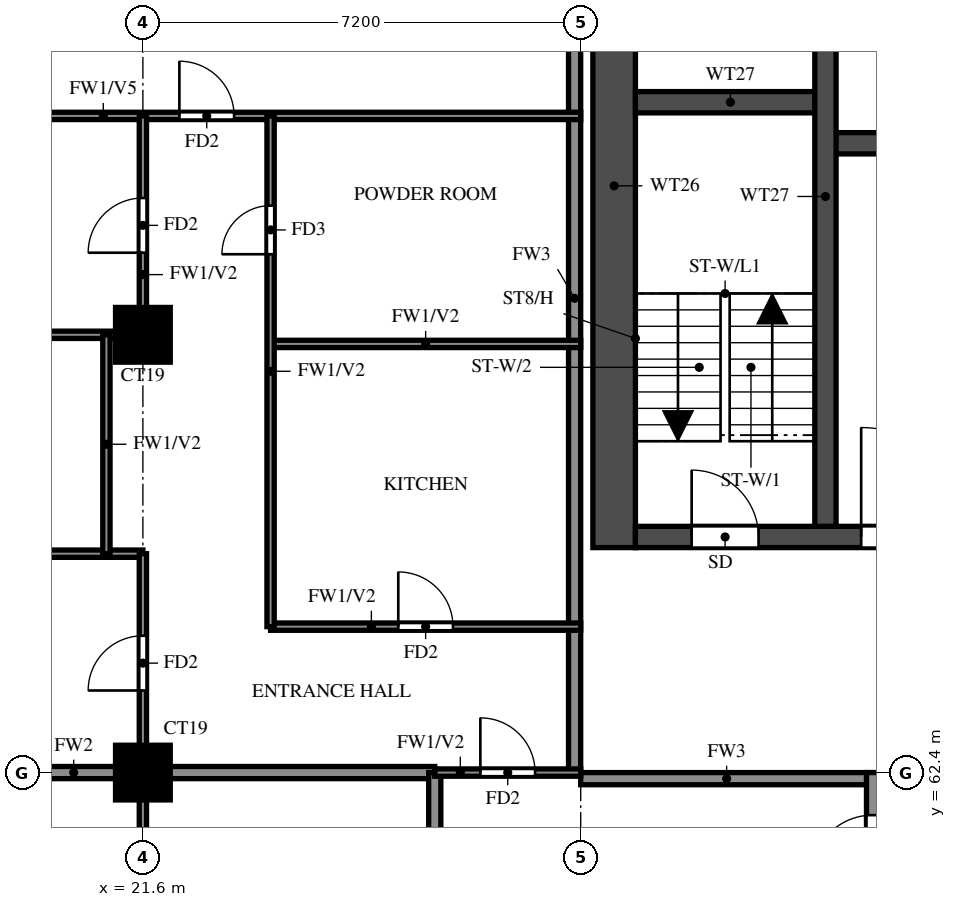
"""IFC4 building model, lengths in metres.
Left out: names, types, materials, properties, quantities, classifications, styles, units other than length and angle.
Written with IfcOpenShell. Run it as: python <this file> out.ifc"""

import sys

from ifc_helpers import new_model, si_unit, direction, frame, frame_2d, origin, origin_2d, place, context, subcontext, project, spatial, rectangle, extrude, source, transform, mapped, element, fill, save


model = new_model("IFC4")
c1 = context("Model", 3, precision=1e-05, world=origin(), true_north=direction((0.0, 1.0)))
c2 = subcontext(c1, "Body", "Model", "MODEL_VIEW")
j1 = project(units=[si_unit("LENGTHUNIT", "METRE"), si_unit("PLANEANGLEUNIT", "RADIAN")], contexts=[c1])
p1 = place(None, origin())
s1 = spatial("IfcSite", under=j1, at=p1, CompositionType="ELEMENT")
p2 = place(p1, origin())
s2 = spatial("IfcBuilding", under=s1, at=p2, CompositionType="ELEMENT")
p3 = place(p2, frame((0.0, 0.0, 195.5)))
s3 = spatial("IfcBuildingStorey", under=s2, at=p3, CompositionType="ELEMENT", Elevation=195.5)
m1 = source(origin(), c2, "Body", "SweptSolid", [
    extrude(rectangle(XDim=0.9, YDim=0.9, at=origin_2d()), origin(), (0.0, 0.0, 1.0), 3.2),
])
for number, where, z_axis, x_axis in (
    (1, (21.6, 62.4, 0.0), (0.0, 0.0, 1.0), (1.0, 0.0, 0.0)),
    (2, (21.6, 69.6, 0.0), (0.0, 0.0, 1.0), (1.0, 0.0, 0.0)),
):
    element("IfcColumn", number, at=place(p3, frame(where, z_axis=z_axis, x_axis=x_axis)), inside=s3, PredefinedType="COLUMN", context=c2, shape_type="MappedRepresentation", body=[
        mapped(m1, transform((0.0, 0.0, 0.0))),
    ])
p4 = place(p3, frame((29.35, 66.1, 0.0), z_axis=(0.0, 0.0, 1.0), x_axis=(0.0, 1.0, 0.0)))
e3 = element("IfcWall", 3, at=p4, inside=s3, PredefinedType="SHEAR", context=c2, shape_type="SweptSolid", body=[
    extrude(rectangle(XDim=11.9, YDim=0.7, at=frame_2d((5.95, 0.0))), origin(), (0.0, 0.0, 1.0), 3.2),
])
p5 = place(p3, frame((29.7, 66.275, 0.0), z_axis=(0.0, 0.0, 1.0), x_axis=(1.0, 0.0, 0.0)))
e4 = element("IfcWall", 4, at=p5, inside=s3, PredefinedType="SHEAR", context=c2, shape_type="SweptSolid", body=[
    extrude(rectangle(XDim=41.4, YDim=0.35, at=frame_2d((20.7, 0.0))), origin(), (0.0, 0.0, 1.0), 3.2),
])
p6 = place(p5, frame((0.925, 0.0, 0.0)))
e5 = element("IfcOpeningElement", 5, at=p6, cuts=e4, PredefinedType="OPENING", context=c2, shape_type="SweptSolid", body=[
    extrude(rectangle(XDim=1.1, YDim=2.1, at=frame_2d((0.55, 1.05))), frame((0.0, 0.185, 0.0), z_axis=(0.0, -1.0, 0.0), x_axis=(1.0, 0.0, 0.0)), (0.0, 0.0, 1.0), 0.37),
])
p7 = place(p5, frame((3.712, 0.0, 0.0)))
e6 = element("IfcOpeningElement", 6, at=p7, cuts=e4, PredefinedType="OPENING", context=c2, shape_type="SweptSolid", body=[
    extrude(rectangle(XDim=1.8, YDim=2.1, at=frame_2d((0.9, 1.05))), frame((0.0, 0.185, 0.0), z_axis=(0.0, -1.0, 0.0), x_axis=(1.0, 0.0, 0.0)), (0.0, 0.0, 1.0), 0.37),
])
p8 = place(p3, frame((32.825, 72.75, 0.0), z_axis=(0.0, 0.0, 1.0), x_axis=(1.0, 0.0, 0.0)))
e7 = element("IfcWall", 7, at=p8, inside=s3, PredefinedType="SHEAR", context=c2, shape_type="SweptSolid", body=[
    extrude(rectangle(XDim=35.15, YDim=0.35, at=frame_2d((17.575, 0.0))), origin(), (0.0, 0.0, 1.0), 3.2),
])
p9 = place(p8, frame((19.8, 0.0, 0.0)))
e8 = element("IfcOpeningElement", 8, at=p9, cuts=e7, PredefinedType="OPENING", context=c2, shape_type="SweptSolid", body=[
    extrude(rectangle(XDim=1.1, YDim=2.1, at=frame_2d((0.55, 1.05))), frame((0.0, 0.185, 0.0), z_axis=(0.0, -1.0, 0.0), x_axis=(1.0, 0.0, 0.0)), (0.0, 0.0, 1.0), 0.37),
])
p10 = place(p8, frame((27.7, 0.0, 0.0)))
e9 = element("IfcOpeningElement", 9, at=p10, cuts=e7, PredefinedType="OPENING", context=c2, shape_type="SweptSolid", body=[
    extrude(rectangle(XDim=1.1, YDim=2.1, at=frame_2d((0.55, 1.05))), frame((0.0, 0.185, 0.0), z_axis=(0.0, -1.0, 0.0), x_axis=(1.0, 0.0, 0.0)), (0.0, 0.0, 1.0), 0.37),
])
p11 = place(p8, frame((30.3, 0.0, 0.0)))
e10 = element("IfcOpeningElement", 10, at=p11, cuts=e7, PredefinedType="OPENING", context=c2, shape_type="SweptSolid", body=[
    extrude(rectangle(XDim=1.1, YDim=2.1, at=frame_2d((0.55, 1.05))), frame((0.0, 0.185, 0.0), z_axis=(0.0, -1.0, 0.0), x_axis=(1.0, 0.0, 0.0)), (0.0, 0.0, 1.0), 0.37),
])
p12 = place(p8, frame((3.8, 0.0, 0.0)))
e11 = element("IfcOpeningElement", 11, at=p12, cuts=e7, PredefinedType="OPENING", context=c2, shape_type="SweptSolid", body=[
    extrude(rectangle(XDim=1.1, YDim=2.1, at=frame_2d((0.55, 1.05))), frame((0.0, 0.185, 0.0), z_axis=(0.0, -1.0, 0.0), x_axis=(1.0, 0.0, 0.0)), (0.0, 0.0, 1.0), 0.37),
])
p13 = place(p8, frame((6.55, 0.0, 0.0)))
e12 = element("IfcOpeningElement", 12, at=p13, cuts=e7, PredefinedType="OPENING", context=c2, shape_type="SweptSolid", body=[
    extrude(rectangle(XDim=1.1, YDim=2.1, at=frame_2d((0.55, 1.05))), frame((0.0, 0.185, 0.0), z_axis=(0.0, -1.0, 0.0), x_axis=(1.0, 0.0, 0.0)), (0.0, 0.0, 1.0), 0.37),
])
p14 = place(p8, frame((9.3, 0.0, 0.0)))
e13 = element("IfcOpeningElement", 13, at=p14, cuts=e7, PredefinedType="OPENING", context=c2, shape_type="SweptSolid", body=[
    extrude(rectangle(XDim=1.1, YDim=2.1, at=frame_2d((0.55, 1.05))), frame((0.0, 0.185, 0.0), z_axis=(0.0, -1.0, 0.0), x_axis=(1.0, 0.0, 0.0)), (0.0, 0.0, 1.0), 0.37),
])
p15 = place(p8, frame((12.05, 0.0, 0.0)))
e14 = element("IfcOpeningElement", 14, at=p15, cuts=e7, PredefinedType="OPENING", context=c2, shape_type="SweptSolid", body=[
    extrude(rectangle(XDim=1.1, YDim=2.1, at=frame_2d((0.55, 1.05))), frame((0.0, 0.185, 0.0), z_axis=(0.0, -1.0, 0.0), x_axis=(1.0, 0.0, 0.0)), (0.0, 0.0, 1.0), 0.37),
])
p16 = place(p8, frame((14.8, 0.0, 0.0)))
e15 = element("IfcOpeningElement", 15, at=p16, cuts=e7, PredefinedType="OPENING", context=c2, shape_type="SweptSolid", body=[
    extrude(rectangle(XDim=1.1, YDim=2.1, at=frame_2d((0.55, 1.05))), frame((0.0, 0.185, 0.0), z_axis=(0.0, -1.0, 0.0), x_axis=(1.0, 0.0, 0.0)), (0.0, 0.0, 1.0), 0.37),
])
p17 = place(p8, frame((17.55, 0.0, 0.0)))
e16 = element("IfcOpeningElement", 16, at=p17, cuts=e7, PredefinedType="OPENING", context=c2, shape_type="SweptSolid", body=[
    extrude(rectangle(XDim=1.1, YDim=2.1, at=frame_2d((0.55, 1.05))), frame((0.0, 0.185, 0.0), z_axis=(0.0, -1.0, 0.0), x_axis=(1.0, 0.0, 0.0)), (0.0, 0.0, 1.0), 0.37),
])
p18 = place(p8, frame((0.938, 0.0, 0.0)))
e17 = element("IfcOpeningElement", 17, at=p18, cuts=e7, PredefinedType="OPENING", context=c2, shape_type="SweptSolid", body=[
    extrude(rectangle(XDim=1.1, YDim=2.1, at=frame_2d((0.55, 1.05))), frame((0.0, 0.185, 0.0), z_axis=(0.0, -1.0, 0.0), x_axis=(1.0, 0.0, 0.0)), (0.0, 0.0, 1.0), 0.37),
])
p19 = place(p3, frame((29.7, 73.425, 0.0), z_axis=(0.0, 0.0, 1.0), x_axis=(1.0, 0.0, 0.0)))
e18 = element("IfcWall", 18, at=p19, inside=s3, PredefinedType="SHEAR", context=c2, shape_type="SweptSolid", body=[
    extrude(rectangle(XDim=3.125, YDim=0.35, at=frame_2d((1.562, 0.0))), origin(), (0.0, 0.0, 1.0), 3.2),
])
p20 = place(p3, frame((32.825, 66.45, 0.0), z_axis=(0.0, 0.0, 1.0), x_axis=(0.0, 1.0, 0.0)))
e19 = element("IfcWall", 19, at=p20, inside=s3, PredefinedType="SHEAR", context=c2, shape_type="SweptSolid", body=[
    extrude(rectangle(XDim=10.85, YDim=0.35, at=frame_2d((5.425, 0.0))), origin(), (0.0, 0.0, 1.0), 3.2),
])
p21 = place(p3, frame((28.8, 62.3, 0.0), z_axis=(0.0, 0.0, 1.0), x_axis=(1.0, 0.0, 0.0)))
e20 = element("IfcWall", 20, at=p21, inside=s3, PredefinedType="SOLIDWALL", context=c2, shape_type="SweptSolid", body=[
    extrude(rectangle(XDim=4.8, YDim=0.2, at=frame_2d((2.4, 0.0))), origin(), (0.0, 0.0, 1.0), 3.2),
])
p22 = place(p3, frame((28.7, 62.4, 0.0), z_axis=(0.0, 0.0, 1.0), x_axis=(0.0, 1.0, 0.0)))
e21 = element("IfcWall", 21, at=p22, inside=s3, PredefinedType="SOLIDWALL", context=c2, shape_type="SweptSolid", body=[
    extrude(rectangle(XDim=15.6, YDim=0.2, at=frame_2d((7.8, 0.0))), origin(), (0.0, 0.0, 1.0), 3.2),
])
p23 = place(p3, frame((33.6, 45.6, 0.0), z_axis=(0.0, 0.0, 1.0), x_axis=(0.0, 1.0, 0.0)))
e22 = element("IfcWall", 22, at=p23, inside=s3, PredefinedType="SOLIDWALL", context=c2, shape_type="SweptSolid", body=[
    extrude(rectangle(XDim=16.8, YDim=0.2, at=frame_2d((8.4, 0.0))), origin(), (0.0, 0.0, 1.0), 3.2),
])
p24 = place(p23, frame((0.7, 0.0, 0.0)))
e23 = element("IfcOpeningElement", 23, at=p24, cuts=e22, PredefinedType="OPENING", context=c2, shape_type="SweptSolid", body=[
    extrude(rectangle(XDim=1.0, YDim=2.1, at=frame_2d((0.5, 1.05))), frame((0.0, 0.11, 0.0), z_axis=(0.0, -1.0, 0.0), x_axis=(1.0, 0.0, 0.0)), (0.0, 0.0, 1.0), 0.22),
])
p25 = place(p23, frame((8.3, 0.0, 0.0)))
e24 = element("IfcOpeningElement", 24, at=p25, cuts=e22, PredefinedType="OPENING", context=c2, shape_type="SweptSolid", body=[
    extrude(rectangle(XDim=1.0, YDim=2.1, at=frame_2d((0.5, 1.05))), frame((0.0, 0.11, 0.0), z_axis=(0.0, -1.0, 0.0), x_axis=(1.0, 0.0, 0.0)), (0.0, 0.0, 1.0), 0.22),
])
p26 = place(p23, frame((15.1, 0.0, 0.0)))
e25 = element("IfcOpeningElement", 25, at=p26, cuts=e22, PredefinedType="OPENING", context=c2, shape_type="SweptSolid", body=[
    extrude(rectangle(XDim=1.0, YDim=2.1, at=frame_2d((0.5, 1.05))), frame((0.0, 0.11, 0.0), z_axis=(0.0, -1.0, 0.0), x_axis=(1.0, 0.0, 0.0)), (0.0, 0.0, 1.0), 0.22),
])
p27 = place(p3, frame((14.525, 62.4, 0.0), z_axis=(0.0, 0.0, 1.0), x_axis=(1.0, 0.0, 0.0)))
e26 = element("IfcWall", 26, at=p27, inside=s3, PredefinedType="SOLIDWALL", context=c2, shape_type="SweptSolid", body=[
    extrude(rectangle(XDim=11.875, YDim=0.2, at=frame_2d((5.938, 0.0))), origin(), (0.0, 0.0, 1.0), 3.2),
])
p28 = place(p3, frame((26.4, 60.0, 0.0), z_axis=(0.0, 0.0, 1.0), x_axis=(0.0, 1.0, 0.0)))
e27 = element("IfcWall", 27, at=p28, inside=s3, PredefinedType="SOLIDWALL", context=c2, shape_type="SweptSolid", body=[
    extrude(rectangle(XDim=2.4, YDim=0.2, at=frame_2d((1.2, 0.0))), origin(), (0.0, 0.0, 1.0), 3.2),
])
p29 = place(p3, frame((26.4, 62.4, 0.0), z_axis=(0.0, 0.0, 1.0), x_axis=(1.0, 0.0, 0.0)))
e28 = element("IfcWall", 28, at=p29, inside=s3, PredefinedType="PARTITIONING", context=c2, shape_type="SweptSolid", body=[
    extrude(rectangle(XDim=2.4, YDim=0.12, at=frame_2d((1.2, 0.0))), origin(), (0.0, 0.0, 1.0), 3.2),
])
p30 = place(p29, frame((0.75, 0.0, 0.0)))
e29 = element("IfcOpeningElement", 29, at=p30, cuts=e28, PredefinedType="OPENING", context=c2, shape_type="SweptSolid", body=[
    extrude(rectangle(XDim=0.9, YDim=2.1, at=frame_2d((0.45, 1.05))), frame((0.0, 0.07, 0.0), z_axis=(0.0, -1.0, 0.0), x_axis=(1.0, 0.0, 0.0)), (0.0, 0.0, 1.0), 0.14),
])
p31 = place(p3, frame((23.7, 64.8, 0.0), z_axis=(0.0, 0.0, 1.0), x_axis=(1.0, 0.0, 0.0)))
e30 = element("IfcWall", 30, at=p31, inside=s3, PredefinedType="PARTITIONING", context=c2, shape_type="SweptSolid", body=[
    extrude(rectangle(XDim=5.1, YDim=0.12, at=frame_2d((2.55, 0.0))), origin(), (0.0, 0.0, 1.0), 3.2),
])
p32 = place(p31, frame((2.1, 0.0, 0.0)))
e31 = element("IfcOpeningElement", 31, at=p32, cuts=e30, PredefinedType="OPENING", context=c2, shape_type="SweptSolid", body=[
    extrude(rectangle(XDim=0.9, YDim=2.1, at=frame_2d((0.45, 1.05))), frame((0.0, 0.07, 0.0), z_axis=(0.0, -1.0, 0.0), x_axis=(1.0, 0.0, 0.0)), (0.0, 0.0, 1.0), 0.14),
])
p33 = place(p3, frame((14.525, 66.0, 0.0), z_axis=(0.0, 0.0, 1.0), x_axis=(1.0, 0.0, 0.0)))
e32 = element("IfcWall", 32, at=p33, inside=s3, PredefinedType="PARTITIONING", context=c2, shape_type="SweptSolid", body=[
    extrude(rectangle(XDim=7.075, YDim=0.12, at=frame_2d((3.538, 0.0))), origin(), (0.0, 0.0, 1.0), 2.3),
])
p34 = place(p33, frame((2.837, 0.0, 0.0)))
e33 = element("IfcOpeningElement", 33, at=p34, cuts=e32, PredefinedType="OPENING", context=c2, shape_type="SweptSolid", body=[
    extrude(rectangle(XDim=0.8, YDim=2.1, at=frame_2d((0.4, 1.05))), frame((0.0, 0.07, 0.0), z_axis=(0.0, -1.0, 0.0), x_axis=(1.0, 0.0, 0.0)), (0.0, 0.0, 1.0), 0.14),
])
p35 = place(p3, frame((23.7, 69.45, 0.0), z_axis=(0.0, 0.0, 1.0), x_axis=(1.0, 0.0, 0.0)))
e34 = element("IfcWall", 34, at=p35, inside=s3, PredefinedType="PARTITIONING", context=c2, shape_type="SweptSolid", body=[
    extrude(rectangle(XDim=5.1, YDim=0.12, at=frame_2d((2.55, 0.0))), origin(), (0.0, 0.0, 1.0), 3.2),
])
p36 = place(p3, frame((14.525, 69.6, 0.0), z_axis=(0.0, 0.0, 1.0), x_axis=(1.0, 0.0, 0.0)))
e35 = element("IfcWall", 35, at=p36, inside=s3, PredefinedType="PARTITIONING", context=c2, shape_type="SweptSolid", body=[
    extrude(rectangle(XDim=7.075, YDim=0.12, at=frame_2d((3.538, 0.0))), origin(), (0.0, 0.0, 1.0), 3.2),
])
p37 = place(p3, frame((14.525, 73.2, 0.0), z_axis=(0.0, 0.0, 1.0), x_axis=(1.0, 0.0, 0.0)))
e36 = element("IfcWall", 36, at=p37, inside=s3, PredefinedType="PARTITIONING", context=c2, shape_type="SweptSolid", body=[
    extrude(rectangle(XDim=14.275, YDim=0.12, at=frame_2d((7.138, 0.0))), origin(), (0.0, 0.0, 1.0), 2.3),
])
p38 = place(p37, frame((7.675, 0.0, 0.0)))
e37 = element("IfcOpeningElement", 37, at=p38, cuts=e36, PredefinedType="OPENING", context=c2, shape_type="SweptSolid", body=[
    extrude(rectangle(XDim=0.9, YDim=2.1, at=frame_2d((0.45, 1.05))), frame((0.0, 0.07, 0.0), z_axis=(0.0, -1.0, 0.0), x_axis=(1.0, 0.0, 0.0)), (0.0, 0.0, 1.0), 0.14),
])
p39 = place(p3, frame((21.0, 66.0, 0.0), z_axis=(0.0, 0.0, 1.0), x_axis=(0.0, 1.0, 0.0)))
e38 = element("IfcWall", 38, at=p39, inside=s3, PredefinedType="PARTITIONING", context=c2, shape_type="SweptSolid", body=[
    extrude(rectangle(XDim=3.6, YDim=0.12, at=frame_2d((1.8, 0.0))), origin(), (0.0, 0.0, 1.0), 3.2),
])
p40 = place(p3, frame((21.6, 48.0, 0.0), z_axis=(0.0, 0.0, 1.0), x_axis=(0.0, 1.0, 0.0)))
e39 = element("IfcWall", 39, at=p40, inside=s3, PredefinedType="PARTITIONING", context=c2, shape_type="SweptSolid", body=[
    extrude(rectangle(XDim=18.0, YDim=0.12, at=frame_2d((9.0, 0.0))), origin(), (0.0, 0.0, 1.0), 3.2),
])
p41 = place(p40, frame((1.35, 0.0, 0.0)))
e40 = element("IfcOpeningElement", 40, at=p41, cuts=e39, PredefinedType="OPENING", context=c2, shape_type="SweptSolid", body=[
    extrude(rectangle(XDim=0.9, YDim=2.1, at=frame_2d((0.45, 1.05))), frame((0.0, 0.07, 0.0), z_axis=(0.0, -1.0, 0.0), x_axis=(1.0, 0.0, 0.0)), (0.0, 0.0, 1.0), 0.14),
])
p42 = place(p40, frame((7.95, 0.0, 0.0)))
e41 = element("IfcOpeningElement", 41, at=p42, cuts=e39, PredefinedType="OPENING", context=c2, shape_type="SweptSolid", body=[
    extrude(rectangle(XDim=1.5, YDim=2.1, at=frame_2d((0.75, 1.05))), frame((0.0, 0.07, 0.0), z_axis=(0.0, -1.0, 0.0), x_axis=(1.0, 0.0, 0.0)), (0.0, 0.0, 1.0), 0.14),
])
p43 = place(p40, frame((12.15, 0.0, 0.0)))
e42 = element("IfcOpeningElement", 42, at=p43, cuts=e39, PredefinedType="OPENING", context=c2, shape_type="SweptSolid", body=[
    extrude(rectangle(XDim=0.9, YDim=2.1, at=frame_2d((0.45, 1.05))), frame((0.0, 0.07, 0.0), z_axis=(0.0, -1.0, 0.0), x_axis=(1.0, 0.0, 0.0)), (0.0, 0.0, 1.0), 0.14),
])
p44 = place(p40, frame((15.75, 0.0, 0.0)))
e43 = element("IfcOpeningElement", 43, at=p44, cuts=e39, PredefinedType="OPENING", context=c2, shape_type="SweptSolid", body=[
    extrude(rectangle(XDim=0.9, YDim=2.1, at=frame_2d((0.45, 1.05))), frame((0.0, 0.07, 0.0), z_axis=(0.0, -1.0, 0.0), x_axis=(1.0, 0.0, 0.0)), (0.0, 0.0, 1.0), 0.14),
])
p45 = place(p3, frame((21.6, 69.6, 0.0), z_axis=(0.0, 0.0, 1.0), x_axis=(0.0, 1.0, 0.0)))
e44 = element("IfcWall", 44, at=p45, inside=s3, PredefinedType="PARTITIONING", context=c2, shape_type="SweptSolid", body=[
    extrude(rectangle(XDim=3.6, YDim=0.12, at=frame_2d((1.8, 0.0))), origin(), (0.0, 0.0, 1.0), 3.2),
])
p46 = place(p45, frame((1.35, 0.0, 0.0)))
e45 = element("IfcOpeningElement", 45, at=p46, cuts=e44, PredefinedType="OPENING", context=c2, shape_type="SweptSolid", body=[
    extrude(rectangle(XDim=0.9, YDim=2.1, at=frame_2d((0.45, 1.05))), frame((0.0, 0.07, 0.0), z_axis=(0.0, -1.0, 0.0), x_axis=(1.0, 0.0, 0.0)), (0.0, 0.0, 1.0), 0.14),
])
p47 = place(p3, frame((23.7, 64.8, 0.0), z_axis=(0.0, 0.0, 1.0), x_axis=(0.0, 1.0, 0.0)))
e46 = element("IfcWall", 46, at=p47, inside=s3, PredefinedType="PARTITIONING", context=c2, shape_type="SweptSolid", body=[
    extrude(rectangle(XDim=8.4, YDim=0.12, at=frame_2d((4.2, 0.0))), origin(), (0.0, 0.0, 1.0), 3.2),
])
p48 = place(p47, frame((6.125, 0.0, 0.0)))
e47 = element("IfcOpeningElement", 47, at=p48, cuts=e46, PredefinedType="OPENING", context=c2, shape_type="SweptSolid", body=[
    extrude(rectangle(XDim=0.8, YDim=2.1, at=frame_2d((0.4, 1.05))), frame((0.0, 0.07, 0.0), z_axis=(0.0, -1.0, 0.0), x_axis=(1.0, 0.0, 0.0)), (0.0, 0.0, 1.0), 0.14),
])
p49 = place(p6, origin())
e48 = element("IfcDoor", 48, at=p49, inside=s3, OperationType="SINGLE_SWING_LEFT", PredefinedType="DOOR", context=c2, shape_type="SweptSolid", body=[
    extrude(rectangle(XDim=1.1, YDim=2.1, at=frame_2d((0.55, 1.05))), frame((0.0, 0.025, 0.0), z_axis=(0.0, -1.0, 0.0), x_axis=(1.0, 0.0, 0.0)), (0.0, 0.0, 1.0), 0.05),
])
fill(e5, e48)
p50 = place(p7, origin())
e49 = element("IfcDoor", 49, at=p50, inside=s3, OperationType="DOUBLE_DOOR_SINGLE_SWING", PredefinedType="DOOR", context=c2, shape_type="SweptSolid", body=[
    extrude(rectangle(XDim=1.8, YDim=2.1, at=frame_2d((0.9, 1.05))), frame((0.0, 0.025, 0.0), z_axis=(0.0, -1.0, 0.0), x_axis=(1.0, 0.0, 0.0)), (0.0, 0.0, 1.0), 0.05),
])
fill(e6, e49)
p51 = place(p30, origin())
e50 = element("IfcDoor", 50, at=p51, inside=s3, OperationType="SINGLE_SWING_RIGHT", PredefinedType="DOOR", context=c2, shape_type="SweptSolid", body=[
    extrude(rectangle(XDim=0.9, YDim=2.1, at=frame_2d((0.45, 1.05))), frame((0.0, 0.025, 0.0), z_axis=(0.0, -1.0, 0.0), x_axis=(1.0, 0.0, 0.0)), (0.0, 0.0, 1.0), 0.05),
])
fill(e29, e50)
p52 = place(p26, origin())
e51 = element("IfcDoor", 51, at=p52, inside=s3, OperationType="SINGLE_SWING_LEFT", PredefinedType="DOOR", context=c2, shape_type="SweptSolid", body=[
    extrude(rectangle(XDim=1.0, YDim=2.1, at=frame_2d((0.5, 1.05))), frame((0.0, 0.025, 0.0), z_axis=(0.0, -1.0, 0.0), x_axis=(1.0, 0.0, 0.0)), (0.0, 0.0, 1.0), 0.05),
])
fill(e25, e51)
p53 = place(p44, origin())
e52 = element("IfcDoor", 52, at=p53, inside=s3, OperationType="SINGLE_SWING_LEFT", PredefinedType="DOOR", context=c2, shape_type="SweptSolid", body=[
    extrude(rectangle(XDim=0.9, YDim=2.1, at=frame_2d((0.45, 1.05))), frame((0.0, 0.025, 0.0), z_axis=(0.0, -1.0, 0.0), x_axis=(1.0, 0.0, 0.0)), (0.0, 0.0, 1.0), 0.05),
])
fill(e43, e52)
p54 = place(p46, origin())
e53 = element("IfcDoor", 53, at=p54, inside=s3, OperationType="SINGLE_SWING_LEFT", PredefinedType="DOOR", context=c2, shape_type="SweptSolid", body=[
    extrude(rectangle(XDim=0.9, YDim=2.1, at=frame_2d((0.45, 1.05))), frame((0.0, 0.025, 0.0), z_axis=(0.0, -1.0, 0.0), x_axis=(1.0, 0.0, 0.0)), (0.0, 0.0, 1.0), 0.05),
])
fill(e45, e53)
p55 = place(p38, origin())
e54 = element("IfcDoor", 54, at=p55, inside=s3, OperationType="SINGLE_SWING_LEFT", PredefinedType="DOOR", context=c2, shape_type="SweptSolid", body=[
    extrude(rectangle(XDim=0.9, YDim=2.1, at=frame_2d((0.45, 1.05))), frame((0.0, 0.025, 0.0), z_axis=(0.0, -1.0, 0.0), x_axis=(1.0, 0.0, 0.0)), (0.0, 0.0, 1.0), 0.05),
])
fill(e37, e54)
p56 = place(p32, origin())
e55 = element("IfcDoor", 55, at=p56, inside=s3, OperationType="SINGLE_SWING_RIGHT", PredefinedType="DOOR", context=c2, shape_type="SweptSolid", body=[
    extrude(rectangle(XDim=0.9, YDim=2.1, at=frame_2d((0.45, 1.05))), frame((0.0, 0.025, 0.0), z_axis=(0.0, -1.0, 0.0), x_axis=(1.0, 0.0, 0.0)), (0.0, 0.0, 1.0), 0.05),
])
fill(e31, e55)
p57 = place(p48, origin())
e56 = element("IfcDoor", 56, at=p57, inside=s3, OperationType="SINGLE_SWING_LEFT", PredefinedType="DOOR", context=c2, shape_type="SweptSolid", body=[
    extrude(rectangle(XDim=0.8, YDim=2.1, at=frame_2d((0.4, 1.05))), frame((0.0, 0.025, 0.0), z_axis=(0.0, -1.0, 0.0), x_axis=(1.0, 0.0, 0.0)), (0.0, 0.0, 1.0), 0.05),
])
fill(e47, e56)
save(model, sys.argv[1])
